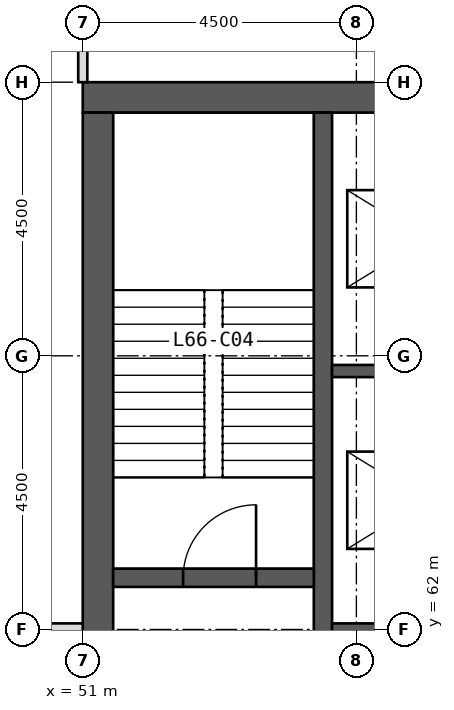
"""IFC4 building model, lengths in metres.
Left out: names, types, materials, properties, quantities, classifications, styles, units other than length and angle.
Written with IfcOpenShell. Run it as: python <this file> out.ifc"""

import sys

from ifc_helpers import new_model, si_unit, direction, frame, frame_2d, origin, place, context, subcontext, project, spatial, rectangle, extrude, element, fill, save


model = new_model("IFC4")
c1 = context("Model", 3, precision=1e-05, world=origin(), true_north=direction((0.0, 1.0)))
c2 = subcontext(c1, "Body", "Model", "MODEL_VIEW")
j1 = project(units=[si_unit("LENGTHUNIT", "METRE"), si_unit("PLANEANGLEUNIT", "RADIAN")], contexts=[c1])
p1 = place(None, origin())
s1 = spatial("IfcSite", under=j1, at=p1, CompositionType="ELEMENT")
p2 = place(p1, origin())
s2 = spatial("IfcBuilding", under=s1, at=p2, CompositionType="ELEMENT")
p3 = place(p2, frame((0.0, 0.0, 274.0)))
s3 = spatial("IfcBuildingStorey", under=s2, at=p3, CompositionType="ELEMENT", Elevation=274.0)
p4 = place(p3, frame((51.0, 70.75, 0.0), z_axis=(0.0, 0.0, 1.0), x_axis=(1.0, 0.0, 0.0)))
e1 = element("IfcWall", 1, at=p4, inside=s3, PredefinedType="SHEAR", context=c2, shape_type="SweptSolid", body=[
    extrude(rectangle(XDim=18.0, YDim=0.5, at=frame_2d((9.0, 0.0))), origin(), (0.0, 0.0, 1.0), 4.0),
])
p5 = place(p4, frame((8.1, 0.0, 0.0)))
e2 = element("IfcOpeningElement", 2, at=p5, cuts=e1, PredefinedType="OPENING", context=c2, shape_type="SweptSolid", body=[
    extrude(rectangle(XDim=1.8, YDim=2.2, at=frame_2d((0.9, 1.1))), frame((0.0, 0.26, 0.0), z_axis=(0.0, -1.0, 0.0), x_axis=(1.0, 0.0, 0.0)), (0.0, 0.0, 1.0), 0.52),
])
p6 = place(p3, frame((51.25, 53.5, 0.0), z_axis=(0.0, 0.0, 1.0), x_axis=(0.0, 1.0, 0.0)))
e3 = element("IfcWall", 3, at=p6, inside=s3, PredefinedType="SHEAR", context=c2, shape_type="SweptSolid", body=[
    extrude(rectangle(XDim=17.0, YDim=0.5, at=frame_2d((8.5, 0.0))), origin(), (0.0, 0.0, 1.0), 4.0),
])
p7 = place(p6, frame((6.1, 0.0, 0.0)))
e4 = element("IfcOpeningElement", 4, at=p7, cuts=e3, PredefinedType="OPENING", context=c2, shape_type="SweptSolid", body=[
    extrude(rectangle(XDim=1.5, YDim=2.2, at=frame_2d((0.75, 1.1))), frame((0.0, 0.26, 0.0), z_axis=(0.0, -1.0, 0.0), x_axis=(1.0, 0.0, 0.0)), (0.0, 0.0, 1.0), 0.52),
])
p8 = place(p3, frame((54.95, 53.5, 0.0), z_axis=(0.0, 0.0, 1.0), x_axis=(0.0, 1.0, 0.0)))
e5 = element("IfcWall", 5, at=p8, inside=s3, PredefinedType="SHEAR", context=c2, shape_type="SweptSolid", body=[
    extrude(rectangle(XDim=17.0, YDim=0.3, at=frame_2d((8.5, 0.0))), origin(), (0.0, 0.0, 1.0), 4.0),
])
for number, where, z_axis, x_axis in (
    (6, (55.1, 62.0, 0.0), (0.0, 0.0, 1.0), (1.0, 0.0, 0.0)),
    (7, (55.1, 66.25, 0.0), (0.0, 0.0, 1.0), (1.0, 0.0, 0.0)),
):
    element("IfcWall", number, at=place(p3, frame(where, z_axis=z_axis, x_axis=x_axis)), inside=s3, PredefinedType="SHEAR", context=c2, shape_type="SweptSolid", body=[
        extrude(rectangle(XDim=3.05, YDim=0.2, at=frame_2d((1.525, 0.0))), origin(), (0.0, 0.0, 1.0), 4.0),
    ])
p9 = place(p3, frame((51.5, 62.85, 0.0), z_axis=(0.0, 0.0, 1.0), x_axis=(1.0, 0.0, 0.0)))
e8 = element("IfcWall", 8, at=p9, inside=s3, PredefinedType="SHEAR", context=c2, shape_type="SweptSolid", body=[
    extrude(rectangle(XDim=3.3, YDim=0.3, at=frame_2d((1.65, 0.0))), origin(), (0.0, 0.0, 1.0), 4.0),
])
p10 = place(p9, frame((1.15, 0.0, 0.0)))
e9 = element("IfcOpeningElement", 9, at=p10, cuts=e8, PredefinedType="OPENING", context=c2, shape_type="SweptSolid", body=[
    extrude(rectangle(XDim=1.2, YDim=2.1, at=frame_2d((0.6, 1.05))), frame((0.0, 0.16, 0.0), z_axis=(0.0, -1.0, 0.0), x_axis=(1.0, 0.0, 0.0)), (0.0, 0.0, 1.0), 0.32),
])
p11 = place(p3, frame((51.0, 71.0, 0.0), z_axis=(0.0, 0.0, 1.0), x_axis=(0.0, 1.0, 0.0)))
e10 = element("IfcWall", 10, at=p11, inside=s3, PredefinedType="PARTITIONING", context=c2, shape_type="SweptSolid", body=[
    extrude(rectangle(XDim=1.5, YDim=0.15, at=frame_2d((0.75, 0.0))), origin(), (0.0, 0.0, 1.0), 3.75),
])
p12 = place(p3, frame((51.0, 62.0, 0.0), z_axis=(0.0, 0.0, 1.0), x_axis=(-1.0, 0.0, 0.0)))
e11 = element("IfcWall", 11, at=p12, inside=s3, PredefinedType="SOLIDWALL", context=c2, shape_type="SweptSolid", body=[
    extrude(rectangle(XDim=1.5, YDim=0.2, at=frame_2d((0.75, 0.0))), origin(), (0.0, 0.0, 1.0), 2.75),
])
p13 = place(p10, origin())
e12 = element("IfcDoor", 12, at=p13, inside=s3, OperationType="SINGLE_SWING_RIGHT", PredefinedType="DOOR", context=c2, shape_type="SweptSolid", body=[
    extrude(rectangle(XDim=1.2, YDim=2.1, at=frame_2d((0.6, 1.05))), frame((0.0, 0.025, 0.0), z_axis=(0.0, -1.0, 0.0), x_axis=(1.0, 0.0, 0.0)), (0.0, 0.0, 1.0), 0.05),
])
fill(e9, e12)
save(model, sys.argv[1])
